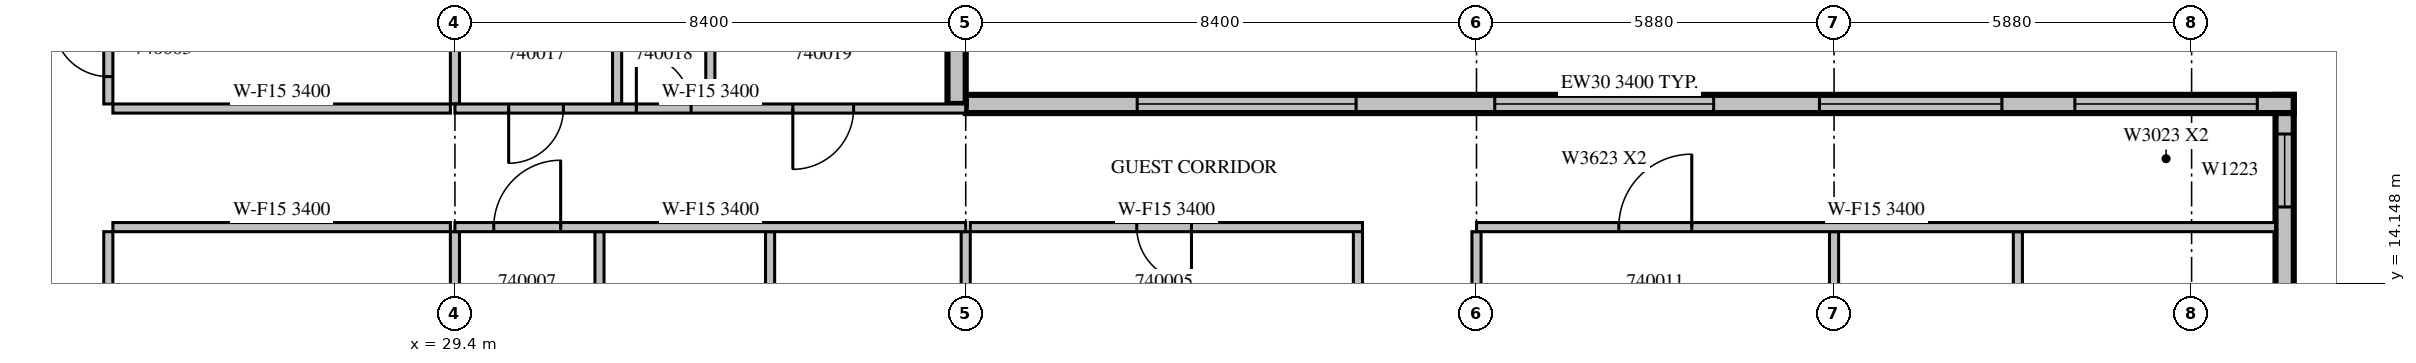
"""IFC4 building model, lengths in metres.
Left out: names, types, materials, properties, quantities, classifications, styles, units other than length and angle.
Written with IfcOpenShell. Run it as: python <this file> out.ifc"""

import sys

from ifc_helpers import new_model, si_unit, direction, frame, frame_2d, origin, place, context, subcontext, project, spatial, rectangle, extrude, source, transform, mapped, element, fill, save


model = new_model("IFC4")
c1 = context("Model", 3, precision=1e-05, world=origin(), true_north=direction((0.0, 1.0)))
c2 = subcontext(c1, "Body", "Model", "MODEL_VIEW")
j1 = project(units=[si_unit("LENGTHUNIT", "METRE"), si_unit("PLANEANGLEUNIT", "RADIAN")], contexts=[c1])
p1 = place(None, origin())
s1 = spatial("IfcSite", under=j1, at=p1, CompositionType="ELEMENT")
p2 = place(p1, origin())
s2 = spatial("IfcBuilding", under=s1, at=p2, CompositionType="ELEMENT")
p3 = place(p2, frame((0.0, 0.0, 185.4)))
s3 = spatial("IfcBuildingStorey", under=s2, at=p3, CompositionType="ELEMENT", Elevation=185.4)
m1 = source(origin(), c2, "Body", "SweptSolid", [
    extrude(rectangle(XDim=3.375, YDim=0.3, at=frame_2d((1.688, 0.0))), origin(), (0.0, 0.0, 1.0), 3.4),
])
p4 = place(p3, frame((59.49, 13.875, 0.0), z_axis=(0.0, 0.0, 1.0), x_axis=(0.0, 1.0, 0.0)))
e1 = element("IfcWall", 1, at=p4, inside=s3, PredefinedType="STANDARD", context=c2, shape_type="MappedRepresentation", body=[
    mapped(m1, transform((0.0, 0.0, 0.0), scale=1.0)),
])
m2 = source(origin(), c2, "Body", "SweptSolid", [
    extrude(rectangle(XDim=1.2, YDim=2.3, at=frame_2d((0.6, 1.15))), frame((0.0, 0.16, 0.0), z_axis=(0.0, -1.0, 0.0), x_axis=(1.0, 0.0, 0.0)), (0.0, 0.0, 1.0), 0.32),
])
p5 = place(p4, frame((1.531, 0.0, 0.6)))
e2 = element("IfcOpeningElement", 2, at=p5, cuts=e1, PredefinedType="OPENING", context=c2, shape_type="MappedRepresentation", body=[
    mapped(m2, transform((0.0, 0.0, 0.0), scale=1.0)),
])
m3 = source(origin(), c2, "Body", "SweptSolid", [
    extrude(rectangle(XDim=21.84, YDim=0.3, at=frame_2d((10.92, 0.0))), origin(), (0.0, 0.0, 1.0), 3.4),
])
p6 = place(p3, frame((59.64, 17.1, 0.0), z_axis=(0.0, 0.0, 1.0), x_axis=(-1.0, 0.0, 0.0)))
e3 = element("IfcWall", 3, at=p6, inside=s3, PredefinedType="STANDARD", context=c2, shape_type="MappedRepresentation", body=[
    mapped(m3, transform((0.0, 0.0, 0.0), scale=1.0)),
])
m4 = source(origin(), c2, "Body", "SweptSolid", [
    extrude(rectangle(XDim=3.0, YDim=2.3, at=frame_2d((1.5, 1.15))), frame((0.0, 0.16, 0.0), z_axis=(0.0, -1.0, 0.0), x_axis=(1.0, 0.0, 0.0)), (0.0, 0.0, 1.0), 0.32),
])
p7 = place(p6, frame((0.6, 0.0, 0.6)))
e4 = element("IfcOpeningElement", 4, at=p7, cuts=e3, PredefinedType="OPENING", context=c2, shape_type="MappedRepresentation", body=[
    mapped(m4, transform((0.0, 0.0, 0.0), scale=1.0)),
])
p8 = place(p6, frame((4.8, 0.0, 0.6)))
e5 = element("IfcOpeningElement", 5, at=p8, cuts=e3, PredefinedType="OPENING", context=c2, shape_type="MappedRepresentation", body=[
    mapped(m4, transform((0.0, 0.0, 0.0), scale=1.0)),
])
m5 = source(origin(), c2, "Body", "SweptSolid", [
    extrude(rectangle(XDim=3.6, YDim=2.3, at=frame_2d((1.8, 1.15))), frame((0.0, 0.16, 0.0), z_axis=(0.0, -1.0, 0.0), x_axis=(1.0, 0.0, 0.0)), (0.0, 0.0, 1.0), 0.32),
])
p9 = place(p6, frame((9.54, 0.0, 0.6)))
e6 = element("IfcOpeningElement", 6, at=p9, cuts=e3, PredefinedType="OPENING", context=c2, shape_type="MappedRepresentation", body=[
    mapped(m5, transform((0.0, 0.0, 0.0), scale=1.0)),
])
p10 = place(p6, frame((15.42, 0.0, 0.6)))
e7 = element("IfcOpeningElement", 7, at=p10, cuts=e3, PredefinedType="OPENING", context=c2, shape_type="MappedRepresentation", body=[
    mapped(m5, transform((0.0, 0.0, 0.0), scale=1.0)),
])
m6 = source(origin(), c2, "Body", "SweptSolid", [
    extrude(rectangle(XDim=3.0, YDim=0.3, at=frame_2d((1.5, 0.0))), origin(), (0.0, 0.0, 1.0), 3.4),
])
p11 = place(p3, frame((37.65, 17.1, 0.0), z_axis=(0.0, 0.0, 1.0), x_axis=(0.0, 1.0, 0.0)))
e8 = element("IfcWall", 8, at=p11, inside=s3, PredefinedType="STANDARD", context=c2, shape_type="MappedRepresentation", body=[
    mapped(m6, transform((0.0, 0.0, 0.0), scale=1.0)),
])
p12 = place(p11, frame((1.425, 0.0, 0.6)))
e9 = element("IfcOpeningElement", 9, at=p12, cuts=e8, PredefinedType="OPENING", context=c2, shape_type="MappedRepresentation", body=[
    mapped(m2, transform((0.0, 0.0, 0.0), scale=1.0)),
])
m7 = source(origin(), c2, "Body", "SweptSolid", [
    extrude(rectangle(XDim=11.525, YDim=0.15, at=frame_2d((5.763, 0.0))), origin(), (0.0, 0.0, 1.0), 3.4),
])
p13 = place(p3, frame((23.7, 15.0, 0.0), z_axis=(0.0, 0.0, 1.0), x_axis=(0.0, -1.0, 0.0)))
e10 = element("IfcWall", 10, at=p13, inside=s3, PredefinedType="PARTITIONING", context=c2, shape_type="MappedRepresentation", body=[
    mapped(m7, transform((0.0, 0.0, 0.0), scale=1.0)),
])
m8 = source(origin(), c2, "Body", "SweptSolid", [
    extrude(rectangle(XDim=0.9, YDim=2.1, at=frame_2d((0.45, 1.05))), frame((0.0, 0.085, 0.0), z_axis=(0.0, -1.0, 0.0), x_axis=(1.0, 0.0, 0.0)), (0.0, 0.0, 1.0), 0.17),
])
p14 = place(p13, frame((7.562, 0.0, 0.0)))
e11 = element("IfcOpeningElement", 11, at=p14, cuts=e10, PredefinedType="OPENING", context=c2, shape_type="MappedRepresentation", body=[
    mapped(m8, transform((0.0, 0.0, 0.0), scale=1.0)),
])
p15 = place(p13, frame((0.925, 0.0, 0.0)))
e12 = element("IfcOpeningElement", 12, at=p15, cuts=e10, PredefinedType="OPENING", context=c2, shape_type="MappedRepresentation", body=[
    mapped(m8, transform((0.0, 0.0, 0.0), scale=1.0)),
])
m9 = source(origin(), c2, "Body", "SweptSolid", [
    extrude(rectangle(XDim=3.6, YDim=0.15, at=frame_2d((1.8, 0.0))), origin(), (0.0, 0.0, 1.0), 3.4),
])
p16 = place(p3, frame((23.7, 20.7, 0.0), z_axis=(0.0, 0.0, 1.0), x_axis=(0.0, -1.0, 0.0)))
e13 = element("IfcWall", 13, at=p16, inside=s3, PredefinedType="PARTITIONING", context=c2, shape_type="MappedRepresentation", body=[
    mapped(m9, transform((0.0, 0.0, 0.0), scale=1.0)),
])
p17 = place(p16, frame((2.25, 0.0, 0.0)))
e14 = element("IfcOpeningElement", 14, at=p17, cuts=e13, PredefinedType="OPENING", context=c2, shape_type="MappedRepresentation", body=[
    mapped(m8, transform((0.0, 0.0, 0.0), scale=1.0)),
])
m10 = source(origin(), c2, "Body", "SweptSolid", [
    extrude(rectangle(XDim=5.55, YDim=0.15, at=frame_2d((2.775, 0.0))), origin(), (0.0, 0.0, 1.0), 3.4),
])
for number, where, z_axis, x_axis in (
    (15, (29.325, 15.075, 0.0), (0.0, 0.0, 1.0), (-1.0, 0.0, 0.0)),
    (16, (23.775, 17.025, 0.0), (0.0, 0.0, 1.0), (1.0, 0.0, 0.0)),
):
    element("IfcWall", number, at=place(p3, frame(where, z_axis=z_axis, x_axis=x_axis)), inside=s3, PredefinedType="PARTITIONING", context=c2, shape_type="MappedRepresentation", body=[
        mapped(m10, transform((0.0, 0.0, 0.0), scale=1.0)),
    ])
m11 = source(origin(), c2, "Body", "SweptSolid", [
    extrude(rectangle(XDim=4.051, YDim=0.15, at=frame_2d((2.026, 0.0))), origin(), (0.0, 0.0, 1.0), 3.4),
])
p18 = place(p3, frame((29.4, 10.949, 0.0), z_axis=(0.0, 0.0, 1.0), x_axis=(0.0, 1.0, 0.0)))
e17 = element("IfcWall", 17, at=p18, inside=s3, PredefinedType="PARTITIONING", context=c2, shape_type="MappedRepresentation", body=[
    mapped(m11, transform((0.0, 0.0, 0.0), scale=1.0)),
])
m12 = source(origin(), c2, "Body", "SweptSolid", [
    extrude(rectangle(XDim=3.001, YDim=0.15, at=frame_2d((1.5, 0.0))), origin(), (0.0, 0.0, 1.0), 3.4),
])
p19 = place(p3, frame((29.4, 17.1, 0.0), z_axis=(0.0, 0.0, 1.0), x_axis=(0.0, 1.0, 0.0)))
e18 = element("IfcWall", 18, at=p19, inside=s3, PredefinedType="PARTITIONING", context=c2, shape_type="MappedRepresentation", body=[
    mapped(m12, transform((0.0, 0.0, 0.0), scale=1.0)),
])
m13 = source(origin(), c2, "Body", "SweptSolid", [
    extrude(rectangle(XDim=3.575, YDim=0.15, at=frame_2d((1.788, 0.0))), origin(), (0.0, 0.0, 1.0), 3.4),
])
p20 = place(p3, frame((44.25, 11.5, 0.0), z_axis=(0.0, 0.0, 1.0), x_axis=(0.0, 1.0, 0.0)))
e19 = element("IfcWall", 19, at=p20, inside=s3, PredefinedType="PARTITIONING", context=c2, shape_type="MappedRepresentation", body=[
    mapped(m13, transform((0.0, 0.0, 0.0), scale=1.0)),
])
m14 = source(origin(), c2, "Body", "SweptSolid", [
    extrude(rectangle(XDim=6.45, YDim=0.15, at=frame_2d((3.225, 0.0))), origin(), (0.0, 0.0, 1.0), 3.4),
])
p21 = place(p3, frame((44.325, 15.075, 0.0), z_axis=(0.0, 0.0, 1.0), x_axis=(-1.0, 0.0, 0.0)))
e20 = element("IfcWall", 20, at=p21, inside=s3, PredefinedType="PARTITIONING", context=c2, shape_type="MappedRepresentation", body=[
    mapped(m14, transform((0.0, 0.0, 0.0), scale=1.0)),
])
p22 = place(p21, frame((2.812, 0.0, 0.0)))
e21 = element("IfcOpeningElement", 21, at=p22, cuts=e20, PredefinedType="OPENING", context=c2, shape_type="MappedRepresentation", body=[
    mapped(m8, transform((0.0, 0.0, 0.0), scale=1.0)),
])
m15 = source(origin(), c2, "Body", "SweptSolid", [
    extrude(rectangle(XDim=3.9, YDim=0.15, at=frame_2d((1.95, 0.0))), origin(), (0.0, 0.0, 1.0), 3.4),
])
for number, where, z_axis, x_axis in (
    (22, (31.777, 11.1, 0.0), (0.0, 0.0, 1.0), (0.0, 1.0, 0.0)),
    (23, (34.583, 11.1, 0.0), (0.0, 0.0, 1.0), (0.0, 1.0, 0.0)),
    (24, (37.8, 11.1, 0.0), (0.0, 0.0, 1.0), (0.0, 1.0, 0.0)),
    (25, (52.08, 11.1, 0.0), (0.0, 0.0, 1.0), (0.0, 1.0, 0.0)),
    (26, (55.103, 11.1, 0.0), (0.0, 0.0, 1.0), (0.0, 1.0, 0.0)),
    (27, (46.2, 11.1, 0.0), (0.0, 0.0, 1.0), (0.0, 1.0, 0.0)),
):
    element("IfcWall", number, at=place(p3, frame(where, z_axis=z_axis, x_axis=x_axis)), inside=s3, PredefinedType="PARTITIONING", context=c2, shape_type="MappedRepresentation", body=[
        mapped(m15, transform((0.0, 0.0, 0.0), scale=1.0)),
    ])
for number, where, z_axis, x_axis in (
    (28, (32.067, 20.7, 0.0), (0.0, 0.0, 1.0), (0.0, -1.0, 0.0)),
    (29, (33.6, 17.1, 0.0), (0.0, 0.0, 1.0), (0.0, 1.0, 0.0)),
):
    element("IfcWall", number, at=place(p3, frame(where, z_axis=z_axis, x_axis=x_axis)), inside=s3, PredefinedType="PARTITIONING", context=c2, shape_type="MappedRepresentation", body=[
        mapped(m9, transform((0.0, 0.0, 0.0), scale=1.0)),
    ])
m16 = source(origin(), c2, "Body", "SweptSolid", [
    extrude(rectangle(XDim=8.4, YDim=0.15, at=frame_2d((4.2, 0.0))), origin(), (0.0, 0.0, 1.0), 3.4),
])
p23 = place(p3, frame((37.8, 15.075, 0.0), z_axis=(0.0, 0.0, 1.0), x_axis=(-1.0, 0.0, 0.0)))
e30 = element("IfcWall", 30, at=p23, inside=s3, PredefinedType="PARTITIONING", context=c2, shape_type="MappedRepresentation", body=[
    mapped(m16, transform((0.0, 0.0, 0.0), scale=1.0)),
])
m17 = source(origin(), c2, "Body", "SweptSolid", [
    extrude(rectangle(XDim=1.1, YDim=2.1, at=frame_2d((0.55, 1.05))), frame((0.0, 0.085, 0.0), z_axis=(0.0, -1.0, 0.0), x_axis=(1.0, 0.0, 0.0)), (0.0, 0.0, 1.0), 0.17),
])
p24 = place(p23, frame((6.662, 0.0, 0.0)))
e31 = element("IfcOpeningElement", 31, at=p24, cuts=e30, PredefinedType="OPENING", context=c2, shape_type="MappedRepresentation", body=[
    mapped(m17, transform((0.0, 0.0, 0.0), scale=1.0)),
])
m18 = source(origin(), c2, "Body", "SweptSolid", [
    extrude(rectangle(XDim=13.14, YDim=0.15, at=frame_2d((6.57, 0.0))), origin(), (0.0, 0.0, 1.0), 3.4),
])
p25 = place(p3, frame((59.34, 15.075, 0.0), z_axis=(0.0, 0.0, 1.0), x_axis=(-1.0, 0.0, 0.0)))
e32 = element("IfcWall", 32, at=p25, inside=s3, PredefinedType="PARTITIONING", context=c2, shape_type="MappedRepresentation", body=[
    mapped(m18, transform((0.0, 0.0, 0.0), scale=1.0)),
])
m19 = source(origin(), c2, "Body", "SweptSolid", [
    extrude(rectangle(XDim=1.2, YDim=2.1, at=frame_2d((0.6, 1.05))), frame((0.0, 0.085, 0.0), z_axis=(0.0, -1.0, 0.0), x_axis=(1.0, 0.0, 0.0)), (0.0, 0.0, 1.0), 0.17),
])
p26 = place(p25, frame((9.6, 0.0, 0.0)))
e33 = element("IfcOpeningElement", 33, at=p26, cuts=e32, PredefinedType="OPENING", context=c2, shape_type="MappedRepresentation", body=[
    mapped(m19, transform((0.0, 0.0, 0.0), scale=1.0)),
])
p27 = place(p3, frame((29.4, 17.025, 0.0), z_axis=(0.0, 0.0, 1.0), x_axis=(1.0, 0.0, 0.0)))
e34 = element("IfcWall", 34, at=p27, inside=s3, PredefinedType="PARTITIONING", context=c2, shape_type="MappedRepresentation", body=[
    mapped(m16, transform((0.0, 0.0, 0.0), scale=1.0)),
])
p28 = place(p27, frame((0.883, 0.0, 0.0)))
e35 = element("IfcOpeningElement", 35, at=p28, cuts=e34, PredefinedType="OPENING", context=c2, shape_type="MappedRepresentation", body=[
    mapped(m8, transform((0.0, 0.0, 0.0), scale=1.0)),
])
p29 = place(p27, frame((2.983, 0.0, 0.0)))
e36 = element("IfcOpeningElement", 36, at=p29, cuts=e34, PredefinedType="OPENING", context=c2, shape_type="MappedRepresentation", body=[
    mapped(m8, transform((0.0, 0.0, 0.0), scale=1.0)),
])
m20 = source(origin(), c2, "Body", "SweptSolid", [
    extrude(rectangle(XDim=1.0, YDim=2.1, at=frame_2d((0.5, 1.05))), frame((0.0, 0.085, 0.0), z_axis=(0.0, -1.0, 0.0), x_axis=(1.0, 0.0, 0.0)), (0.0, 0.0, 1.0), 0.17),
])
p30 = place(p27, frame((5.557, 0.0, 0.0)))
e37 = element("IfcOpeningElement", 37, at=p30, cuts=e34, PredefinedType="OPENING", context=c2, shape_type="MappedRepresentation", body=[
    mapped(m20, transform((0.0, 0.0, 0.0), scale=1.0)),
])
m21 = source(origin(), c2, "Body", "SweptSolid", [
    extrude(rectangle(XDim=1.2, YDim=2.3, at=frame_2d((0.6, 1.15))), frame((0.0, 0.03, 0.0), z_axis=(0.0, -1.0, 0.0), x_axis=(1.0, 0.0, 0.0)), (0.0, 0.0, 1.0), 0.06),
])
p31 = place(p5, origin())
e38 = element("IfcWindow", 38, at=p31, inside=s3, PartitioningType="SINGLE_PANEL", PredefinedType="WINDOW", context=c2, shape_type="MappedRepresentation", body=[
    mapped(m21, transform((0.0, 0.0, 0.0), scale=1.0)),
])
fill(e2, e38)
m22 = source(origin(), c2, "Body", "SweptSolid", [
    extrude(rectangle(XDim=3.0, YDim=2.3, at=frame_2d((1.5, 1.15))), frame((0.0, 0.03, 0.0), z_axis=(0.0, -1.0, 0.0), x_axis=(1.0, 0.0, 0.0)), (0.0, 0.0, 1.0), 0.06),
])
p32 = place(p7, origin())
e39 = element("IfcWindow", 39, at=p32, inside=s3, PartitioningType="SINGLE_PANEL", PredefinedType="WINDOW", context=c2, shape_type="MappedRepresentation", body=[
    mapped(m22, transform((0.0, 0.0, 0.0), scale=1.0)),
])
fill(e4, e39)
p33 = place(p8, origin())
e40 = element("IfcWindow", 40, at=p33, inside=s3, PartitioningType="SINGLE_PANEL", PredefinedType="WINDOW", context=c2, shape_type="MappedRepresentation", body=[
    mapped(m22, transform((0.0, 0.0, 0.0), scale=1.0)),
])
fill(e5, e40)
m23 = source(origin(), c2, "Body", "SweptSolid", [
    extrude(rectangle(XDim=3.6, YDim=2.3, at=frame_2d((1.8, 1.15))), frame((0.0, 0.03, 0.0), z_axis=(0.0, -1.0, 0.0), x_axis=(1.0, 0.0, 0.0)), (0.0, 0.0, 1.0), 0.06),
])
p34 = place(p9, origin())
e41 = element("IfcWindow", 41, at=p34, inside=s3, PartitioningType="SINGLE_PANEL", PredefinedType="WINDOW", context=c2, shape_type="MappedRepresentation", body=[
    mapped(m23, transform((0.0, 0.0, 0.0), scale=1.0)),
])
fill(e6, e41)
p35 = place(p10, origin())
e42 = element("IfcWindow", 42, at=p35, inside=s3, PartitioningType="SINGLE_PANEL", PredefinedType="WINDOW", context=c2, shape_type="MappedRepresentation", body=[
    mapped(m23, transform((0.0, 0.0, 0.0), scale=1.0)),
])
fill(e7, e42)
m24 = source(origin(), c2, "Body", "SweptSolid", [
    extrude(rectangle(XDim=0.9, YDim=2.1, at=frame_2d((0.45, 1.05))), frame((0.0, 0.025, 0.0), z_axis=(0.0, -1.0, 0.0), x_axis=(1.0, 0.0, 0.0)), (0.0, 0.0, 1.0), 0.05),
])
p36 = place(p17, origin())
e43 = element("IfcDoor", 43, at=p36, inside=s3, OperationType="SINGLE_SWING_RIGHT", PredefinedType="DOOR", context=c2, shape_type="MappedRepresentation", body=[
    mapped(m24, transform((0.0, 0.0, 0.0), scale=1.0)),
])
fill(e14, e43)
p37 = place(p22, origin())
e44 = element("IfcDoor", 44, at=p37, inside=s3, OperationType="SINGLE_SWING_LEFT", PredefinedType="DOOR", context=c2, shape_type="MappedRepresentation", body=[
    mapped(m24, transform((0.0, 0.0, 0.0), scale=1.0)),
])
fill(e21, e44)
m25 = source(origin(), c2, "Body", "SweptSolid", [
    extrude(rectangle(XDim=1.1, YDim=2.1, at=frame_2d((0.55, 1.05))), frame((0.0, 0.025, 0.0), z_axis=(0.0, -1.0, 0.0), x_axis=(1.0, 0.0, 0.0)), (0.0, 0.0, 1.0), 0.05),
])
p38 = place(p24, origin())
e45 = element("IfcDoor", 45, at=p38, inside=s3, OperationType="SINGLE_SWING_RIGHT", PredefinedType="DOOR", context=c2, shape_type="MappedRepresentation", body=[
    mapped(m25, transform((0.0, 0.0, 0.0), scale=1.0)),
])
fill(e31, e45)
m26 = source(origin(), c2, "Body", "SweptSolid", [
    extrude(rectangle(XDim=1.2, YDim=2.1, at=frame_2d((0.6, 1.05))), frame((0.0, 0.025, 0.0), z_axis=(0.0, -1.0, 0.0), x_axis=(1.0, 0.0, 0.0)), (0.0, 0.0, 1.0), 0.05),
])
p39 = place(p26, origin())
e46 = element("IfcDoor", 46, at=p39, inside=s3, OperationType="SINGLE_SWING_RIGHT", PredefinedType="DOOR", context=c2, shape_type="MappedRepresentation", body=[
    mapped(m26, transform((0.0, 0.0, 0.0), scale=1.0)),
])
fill(e33, e46)
p40 = place(p28, origin())
e47 = element("IfcDoor", 47, at=p40, inside=s3, OperationType="SINGLE_SWING_RIGHT", PredefinedType="DOOR", context=c2, shape_type="MappedRepresentation", body=[
    mapped(m24, transform((0.0, 0.0, 0.0), scale=1.0)),
])
fill(e35, e47)
p41 = place(p29, origin())
e48 = element("IfcDoor", 48, at=p41, inside=s3, OperationType="SINGLE_SWING_LEFT", PredefinedType="DOOR", context=c2, shape_type="MappedRepresentation", body=[
    mapped(m24, transform((0.0, 0.0, 0.0), scale=1.0)),
])
fill(e36, e48)
m27 = source(origin(), c2, "Body", "SweptSolid", [
    extrude(rectangle(XDim=1.0, YDim=2.1, at=frame_2d((0.5, 1.05))), frame((0.0, 0.025, 0.0), z_axis=(0.0, -1.0, 0.0), x_axis=(1.0, 0.0, 0.0)), (0.0, 0.0, 1.0), 0.05),
])
p42 = place(p30, origin())
e49 = element("IfcDoor", 49, at=p42, inside=s3, OperationType="SINGLE_SWING_RIGHT", PredefinedType="DOOR", context=c2, shape_type="MappedRepresentation", body=[
    mapped(m27, transform((0.0, 0.0, 0.0), scale=1.0)),
])
fill(e37, e49)
save(model, sys.argv[1])
